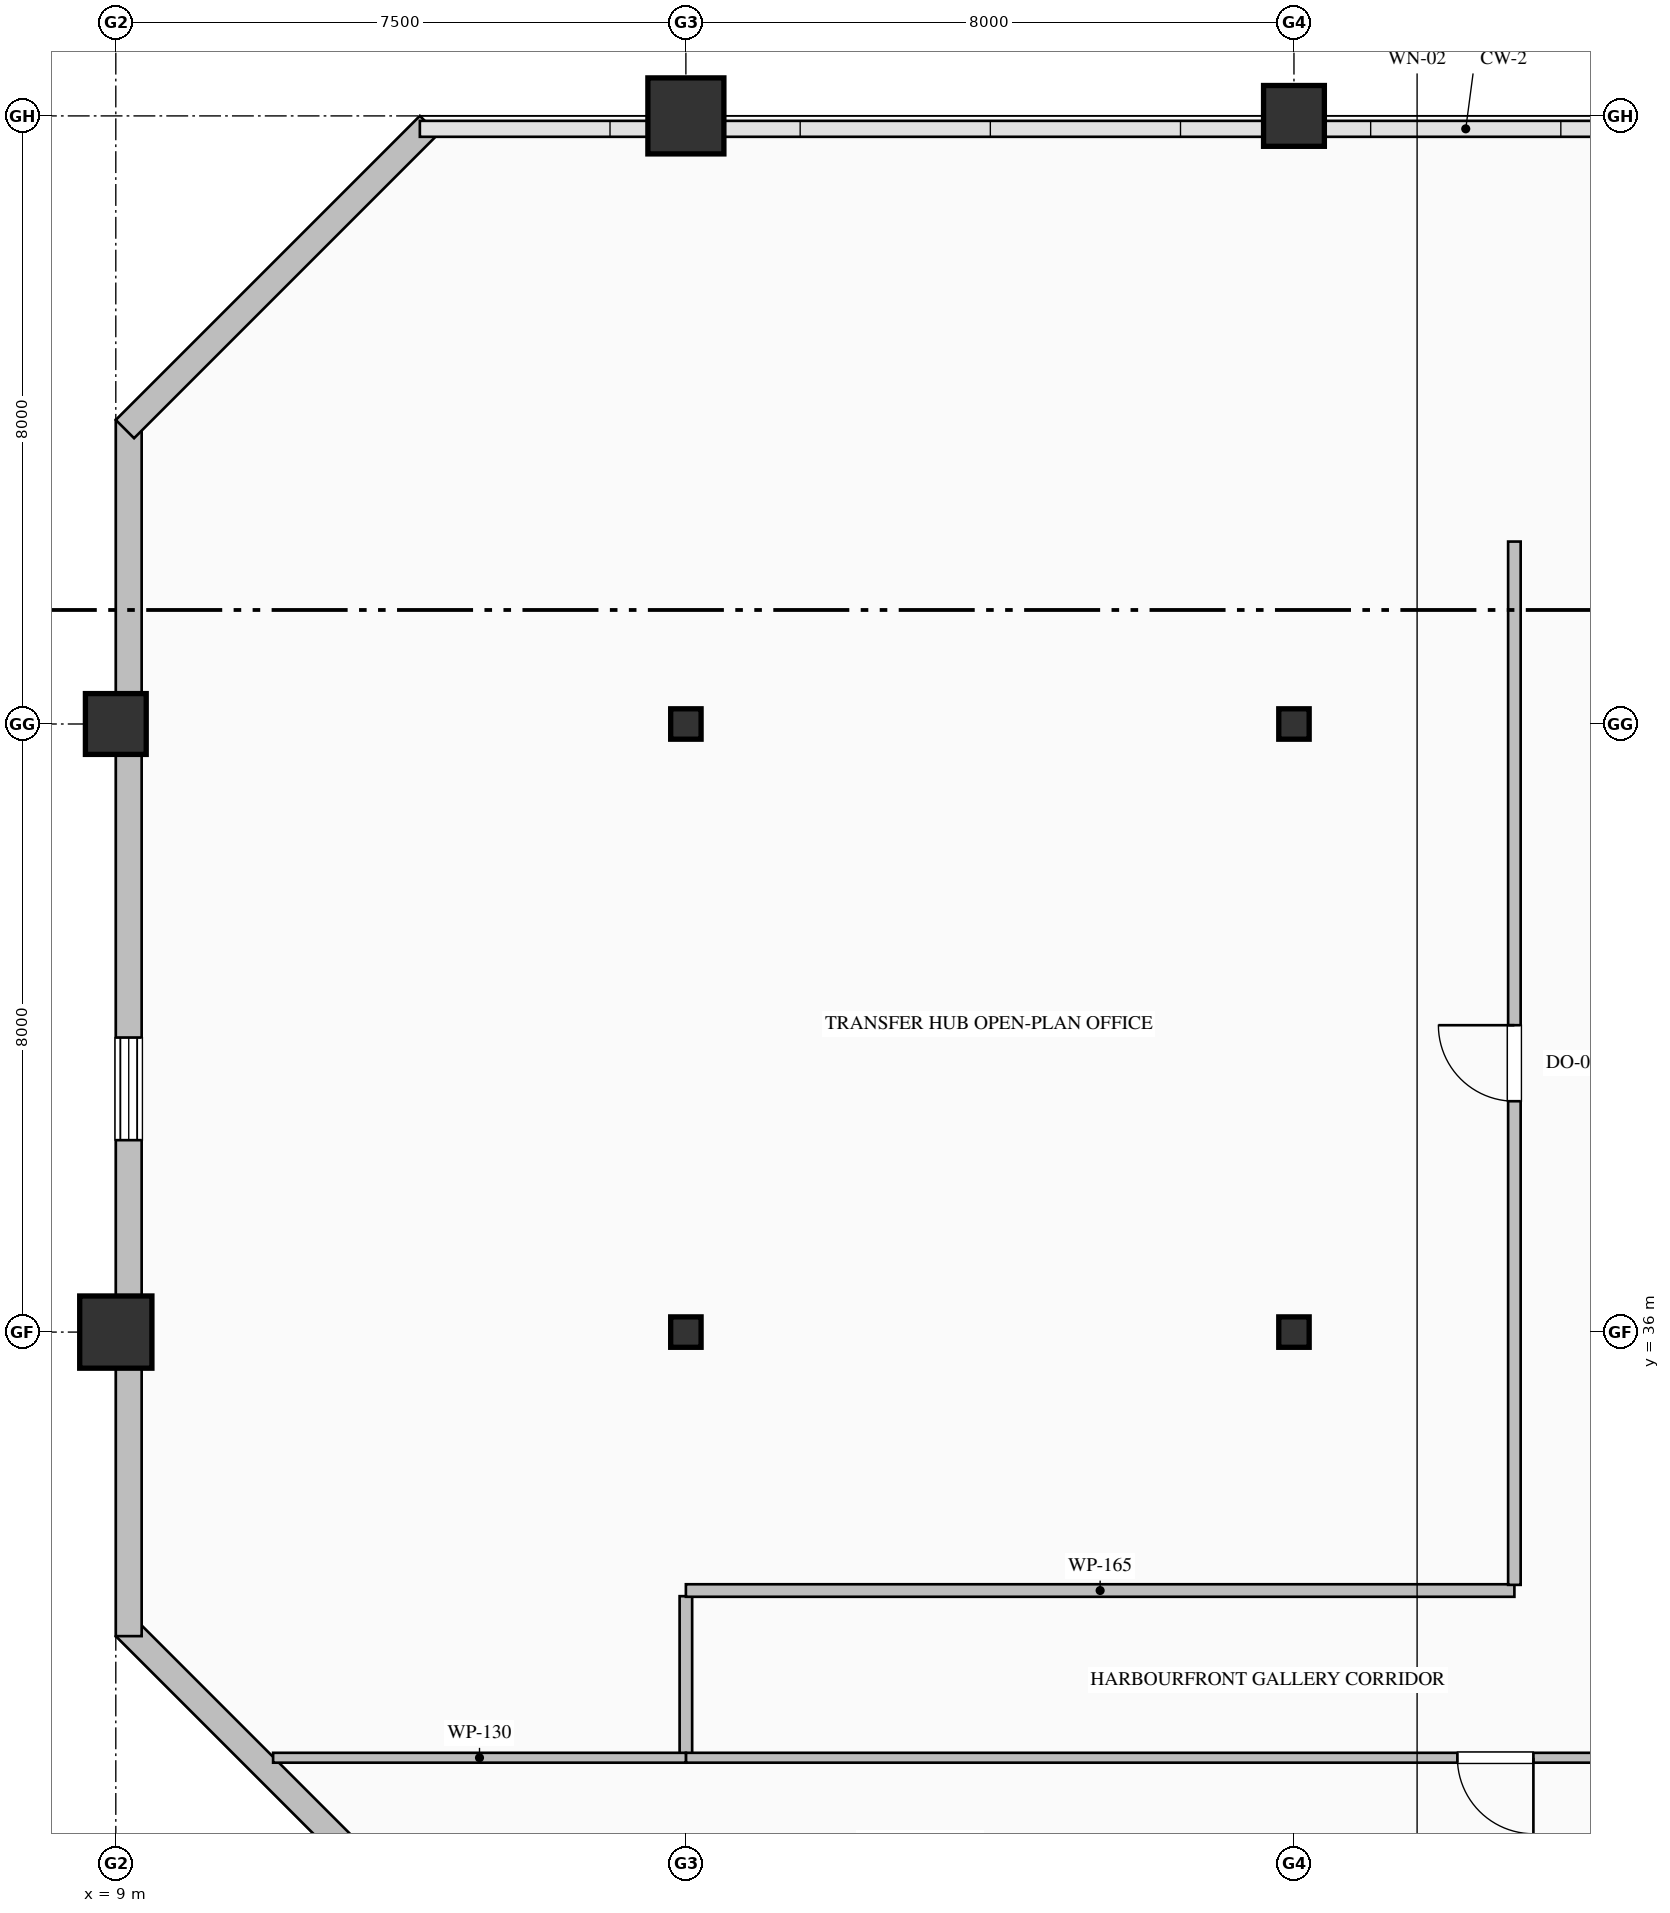
"""IFC4 building model, lengths in metres.
Left out: names, types, materials, properties, quantities, classifications, styles, units other than length and angle.
Written with IfcOpenShell. Run it as: python <this file> out.ifc"""

import sys

from ifc_helpers import new_model, si_unit, direction, frame, frame_2d, origin, origin_2d, place, context, subcontext, project, spatial, rectangle, hollow_rectangle, hollow_circle, i_section, extrude, element, fill, save


model = new_model("IFC4")
c1 = context("Model", 3, precision=1e-05, world=origin(), true_north=direction((0.0, 1.0)))
c2 = subcontext(c1, "Body", "Model", "MODEL_VIEW")
j1 = project(units=[si_unit("LENGTHUNIT", "METRE"), si_unit("PLANEANGLEUNIT", "RADIAN")], contexts=[c1])
p1 = place(None, origin())
s1 = spatial("IfcSite", under=j1, at=p1, CompositionType="ELEMENT")
p2 = place(p1, origin())
s2 = spatial("IfcBuilding", under=s1, at=p2, CompositionType="ELEMENT")
p3 = place(p2, frame((0.0, 0.0, 200.4)))
s3 = spatial("IfcBuildingStorey", under=s2, at=p3, CompositionType="ELEMENT", Elevation=200.4)
p4 = place(p3, frame((9.0, 36.0, 0.0), z_axis=(0.0, 0.0, 1.0), x_axis=(1.0, 0.0, 0.0)))
e1 = element("IfcColumn", 1, at=p4, inside=s3, PredefinedType="COLUMN", context=c2, shape_type="SweptSolid", body=[
    extrude(hollow_rectangle(XDim=0.95, YDim=0.95, WallThickness=0.036, at=origin_2d()), origin(), (0.0, 0.0, 1.0), 5.4),
])
p5 = place(p3, frame((9.0, 44.0, 0.0), z_axis=(0.0, 0.0, 1.0), x_axis=(1.0, 0.0, 0.0)))
e2 = element("IfcColumn", 2, at=p5, inside=s3, PredefinedType="COLUMN", context=c2, shape_type="SweptSolid", body=[
    extrude(hollow_rectangle(XDim=0.8, YDim=0.8, WallThickness=0.032, at=origin_2d()), origin(), (0.0, 0.0, 1.0), 5.4),
])
for number, where, z_axis, x_axis in (
    (3, (16.5, 36.0, 0.0), (0.0, 0.0, 1.0), (1.0, 0.0, 0.0)),
    (4, (16.5, 44.0, 0.0), (0.0, 0.0, 1.0), (1.0, 0.0, 0.0)),
):
    element("IfcColumn", number, at=place(p3, frame(where, z_axis=z_axis, x_axis=x_axis)), inside=s3, PredefinedType="COLUMN", context=c2, shape_type="SweptSolid", body=[
        extrude(i_section(OverallWidth=0.4, OverallDepth=0.4, WebThickness=0.013, FlangeThickness=0.021, FilletRadius=0.022, at=origin_2d()), origin(), (0.0, 0.0, 1.0), 5.4),
    ])
p6 = place(p3, frame((16.5, 52.0, 0.0), z_axis=(0.0, 0.0, 1.0), x_axis=(1.0, 0.0, 0.0)))
e5 = element("IfcColumn", 5, at=p6, inside=s3, PredefinedType="COLUMN", context=c2, shape_type="SweptSolid", body=[
    extrude(hollow_circle(Radius=0.5, WallThickness=0.036, at=origin_2d()), origin(), (0.0, 0.0, 1.0), 5.4),
])
for number, where, z_axis, x_axis in (
    (6, (24.5, 36.0, 0.0), (0.0, 0.0, 1.0), (1.0, 0.0, 0.0)),
    (7, (24.5, 44.0, 0.0), (0.0, 0.0, 1.0), (1.0, 0.0, 0.0)),
):
    element("IfcColumn", number, at=place(p3, frame(where, z_axis=z_axis, x_axis=x_axis)), inside=s3, PredefinedType="COLUMN", context=c2, shape_type="SweptSolid", body=[
        extrude(i_section(OverallWidth=0.4, OverallDepth=0.4, WebThickness=0.013, FlangeThickness=0.021, FilletRadius=0.022, at=origin_2d()), origin(), (0.0, 0.0, 1.0), 5.4),
    ])
p7 = place(p3, frame((24.5, 52.0, 0.0), z_axis=(0.0, 0.0, 1.0), x_axis=(1.0, 0.0, 0.0)))
e8 = element("IfcColumn", 8, at=p7, inside=s3, PredefinedType="COLUMN", context=c2, shape_type="SweptSolid", body=[
    extrude(hollow_rectangle(XDim=0.8, YDim=0.8, WallThickness=0.032, at=origin_2d()), origin(), (0.0, 0.0, 1.0), 5.4),
])
p8 = place(p3, frame((13.12, 28.12, 0.0), z_axis=(0.0, 0.0, 1.0), x_axis=(-0.707106781187, 0.707106781187, 0.0)))
e9 = element("IfcWall", 9, at=p8, inside=s3, PredefinedType="SOLIDWALL", context=c2, shape_type="SweptSolid", body=[
    extrude(rectangle(XDim=5.657, YDim=0.34, at=frame_2d((2.828, 0.0))), origin(), (0.0, 0.0, 1.0), 5.175),
])
p9 = place(p3, frame((9.17, 32.0, 0.0), z_axis=(0.0, 0.0, 1.0), x_axis=(0.0, 1.0, 0.0)))
e10 = element("IfcWall", 10, at=p9, inside=s3, PredefinedType="SOLIDWALL", context=c2, shape_type="SweptSolid", body=[
    extrude(rectangle(XDim=16.0, YDim=0.34, at=frame_2d((8.0, 0.0))), origin(), (0.0, 0.0, 1.0), 4.725),
])
p10 = place(p9, frame((6.525, 0.0, 0.9)))
e11 = element("IfcOpeningElement", 11, at=p10, cuts=e10, PredefinedType="OPENING", context=c2, shape_type="SweptSolid", body=[
    extrude(rectangle(XDim=1.35, YDim=1.85, at=frame_2d((0.675, 0.925))), frame((0.0, 0.18, 0.0), z_axis=(0.0, -1.0, 0.0), x_axis=(1.0, 0.0, 0.0)), (0.0, 0.0, 1.0), 0.36),
])
p11 = place(p3, frame((9.12, 47.88, 0.0), z_axis=(0.0, 0.0, 1.0), x_axis=(0.707106781187, 0.707106781187, 0.0)))
e12 = element("IfcWall", 12, at=p11, inside=s3, PredefinedType="SOLIDWALL", context=c2, shape_type="SweptSolid", body=[
    extrude(rectangle(XDim=5.657, YDim=0.34, at=frame_2d((2.828, 0.0))), origin(), (0.0, 0.0, 1.0), 5.175),
])
p12 = place(p3, frame((16.5, 30.457, 0.0), z_axis=(0.0, 0.0, 1.0), x_axis=(0.0, 1.0, 0.0)))
e13 = element("IfcWall", 13, at=p12, inside=s3, PredefinedType="PARTITIONING", context=c2, shape_type="SweptSolid", body=[
    extrude(rectangle(XDim=2.068, YDim=0.165, at=frame_2d((1.034, 0.0))), origin(), (0.0, 0.0, 1.0), 4.579),
])
p13 = place(p3, frame((16.5, 32.6, 0.0), z_axis=(0.0, 0.0, 1.0), x_axis=(1.0, 0.0, 0.0)))
e14 = element("IfcWall", 14, at=p13, inside=s3, PredefinedType="PARTITIONING", context=c2, shape_type="SweptSolid", body=[
    extrude(rectangle(XDim=10.9, YDim=0.165, at=frame_2d((5.45, 0.0))), origin(), (0.0, 0.0, 1.0), 5.175),
])
p14 = place(p3, frame((37.8, 30.4, 0.0), z_axis=(0.0, 0.0, 1.0), x_axis=(-1.0, 0.0, 0.0)))
e15 = element("IfcWall", 15, at=p14, inside=s3, PredefinedType="PARTITIONING", context=c2, shape_type="SweptSolid", body=[
    extrude(rectangle(XDim=21.3, YDim=0.13, at=frame_2d((10.65, 0.0))), origin(), (0.0, 0.0, 1.0), 5.175),
])
p15 = place(p14, frame((10.15, 0.0, 0.0)))
e16 = element("IfcOpeningElement", 16, at=p15, cuts=e15, PredefinedType="OPENING", context=c2, shape_type="SweptSolid", body=[
    extrude(rectangle(XDim=1.0, YDim=2.15, at=frame_2d((0.5, 1.075))), frame((0.0, 0.075, 0.0), z_axis=(0.0, -1.0, 0.0), x_axis=(1.0, 0.0, 0.0)), (0.0, 0.0, 1.0), 0.15),
])
p16 = place(p3, frame((27.4, 32.675, 0.0), z_axis=(0.0, 0.0, 1.0), x_axis=(0.0, 1.0, 0.0)))
e17 = element("IfcWall", 17, at=p16, inside=s3, PredefinedType="PARTITIONING", context=c2, shape_type="SweptSolid", body=[
    extrude(rectangle(XDim=13.725, YDim=0.165, at=frame_2d((6.863, 0.0))), origin(), (0.0, 0.0, 1.0), 5.175),
])
p17 = place(p16, frame((6.363, 0.0, 0.0)))
e18 = element("IfcOpeningElement", 18, at=p17, cuts=e17, PredefinedType="OPENING", context=c2, shape_type="SweptSolid", body=[
    extrude(rectangle(XDim=1.0, YDim=2.15, at=frame_2d((0.5, 1.075))), frame((0.0, 0.093, 0.0), z_axis=(0.0, -1.0, 0.0), x_axis=(1.0, 0.0, 0.0)), (0.0, 0.0, 1.0), 0.185),
])
p18 = place(p3, frame((16.5, 30.4, 0.0), z_axis=(0.0, 0.0, 1.0), x_axis=(-1.0, 0.0, 0.0)))
e19 = element("IfcWall", 19, at=p18, inside=s3, PredefinedType="PARTITIONING", context=c2, shape_type="SweptSolid", body=[
    extrude(rectangle(XDim=5.43, YDim=0.13, at=frame_2d((2.715, 0.0))), origin(), (0.0, 0.0, 1.0), 5.175),
])
p19 = place(p10, origin())
e20 = element("IfcWindow", 20, at=p19, inside=s3, PartitioningType="DOUBLE_PANEL_VERTICAL", PredefinedType="WINDOW", context=c2, shape_type="SweptSolid", body=[
    extrude(rectangle(XDim=1.35, YDim=1.85, at=frame_2d((0.675, 0.925))), frame((0.0, 0.15, 0.0), z_axis=(0.0, -1.0, 0.0), x_axis=(1.0, 0.0, 0.0)), (0.0, 0.0, 1.0), 0.06),
])
fill(e11, e20)
p20 = place(p17, origin())
e21 = element("IfcDoor", 21, at=p20, inside=s3, OperationType="SINGLE_SWING_RIGHT", PredefinedType="DOOR", context=c2, shape_type="SweptSolid", body=[
    extrude(rectangle(XDim=1.0, YDim=2.15, at=frame_2d((0.5, 1.075))), frame((0.0, 0.025, 0.0), z_axis=(0.0, -1.0, 0.0), x_axis=(1.0, 0.0, 0.0)), (0.0, 0.0, 1.0), 0.05),
])
fill(e18, e21)
p21 = place(p15, origin())
e22 = element("IfcDoor", 22, at=p21, inside=s3, OperationType="SINGLE_SWING_LEFT", PredefinedType="DOOR", context=c2, shape_type="SweptSolid", body=[
    extrude(rectangle(XDim=1.0, YDim=2.15, at=frame_2d((0.5, 1.075))), frame((0.0, 0.025, 0.0), z_axis=(0.0, -1.0, 0.0), x_axis=(1.0, 0.0, 0.0)), (0.0, 0.0, 1.0), 0.05),
])
fill(e16, e22)
save(model, sys.argv[1])
